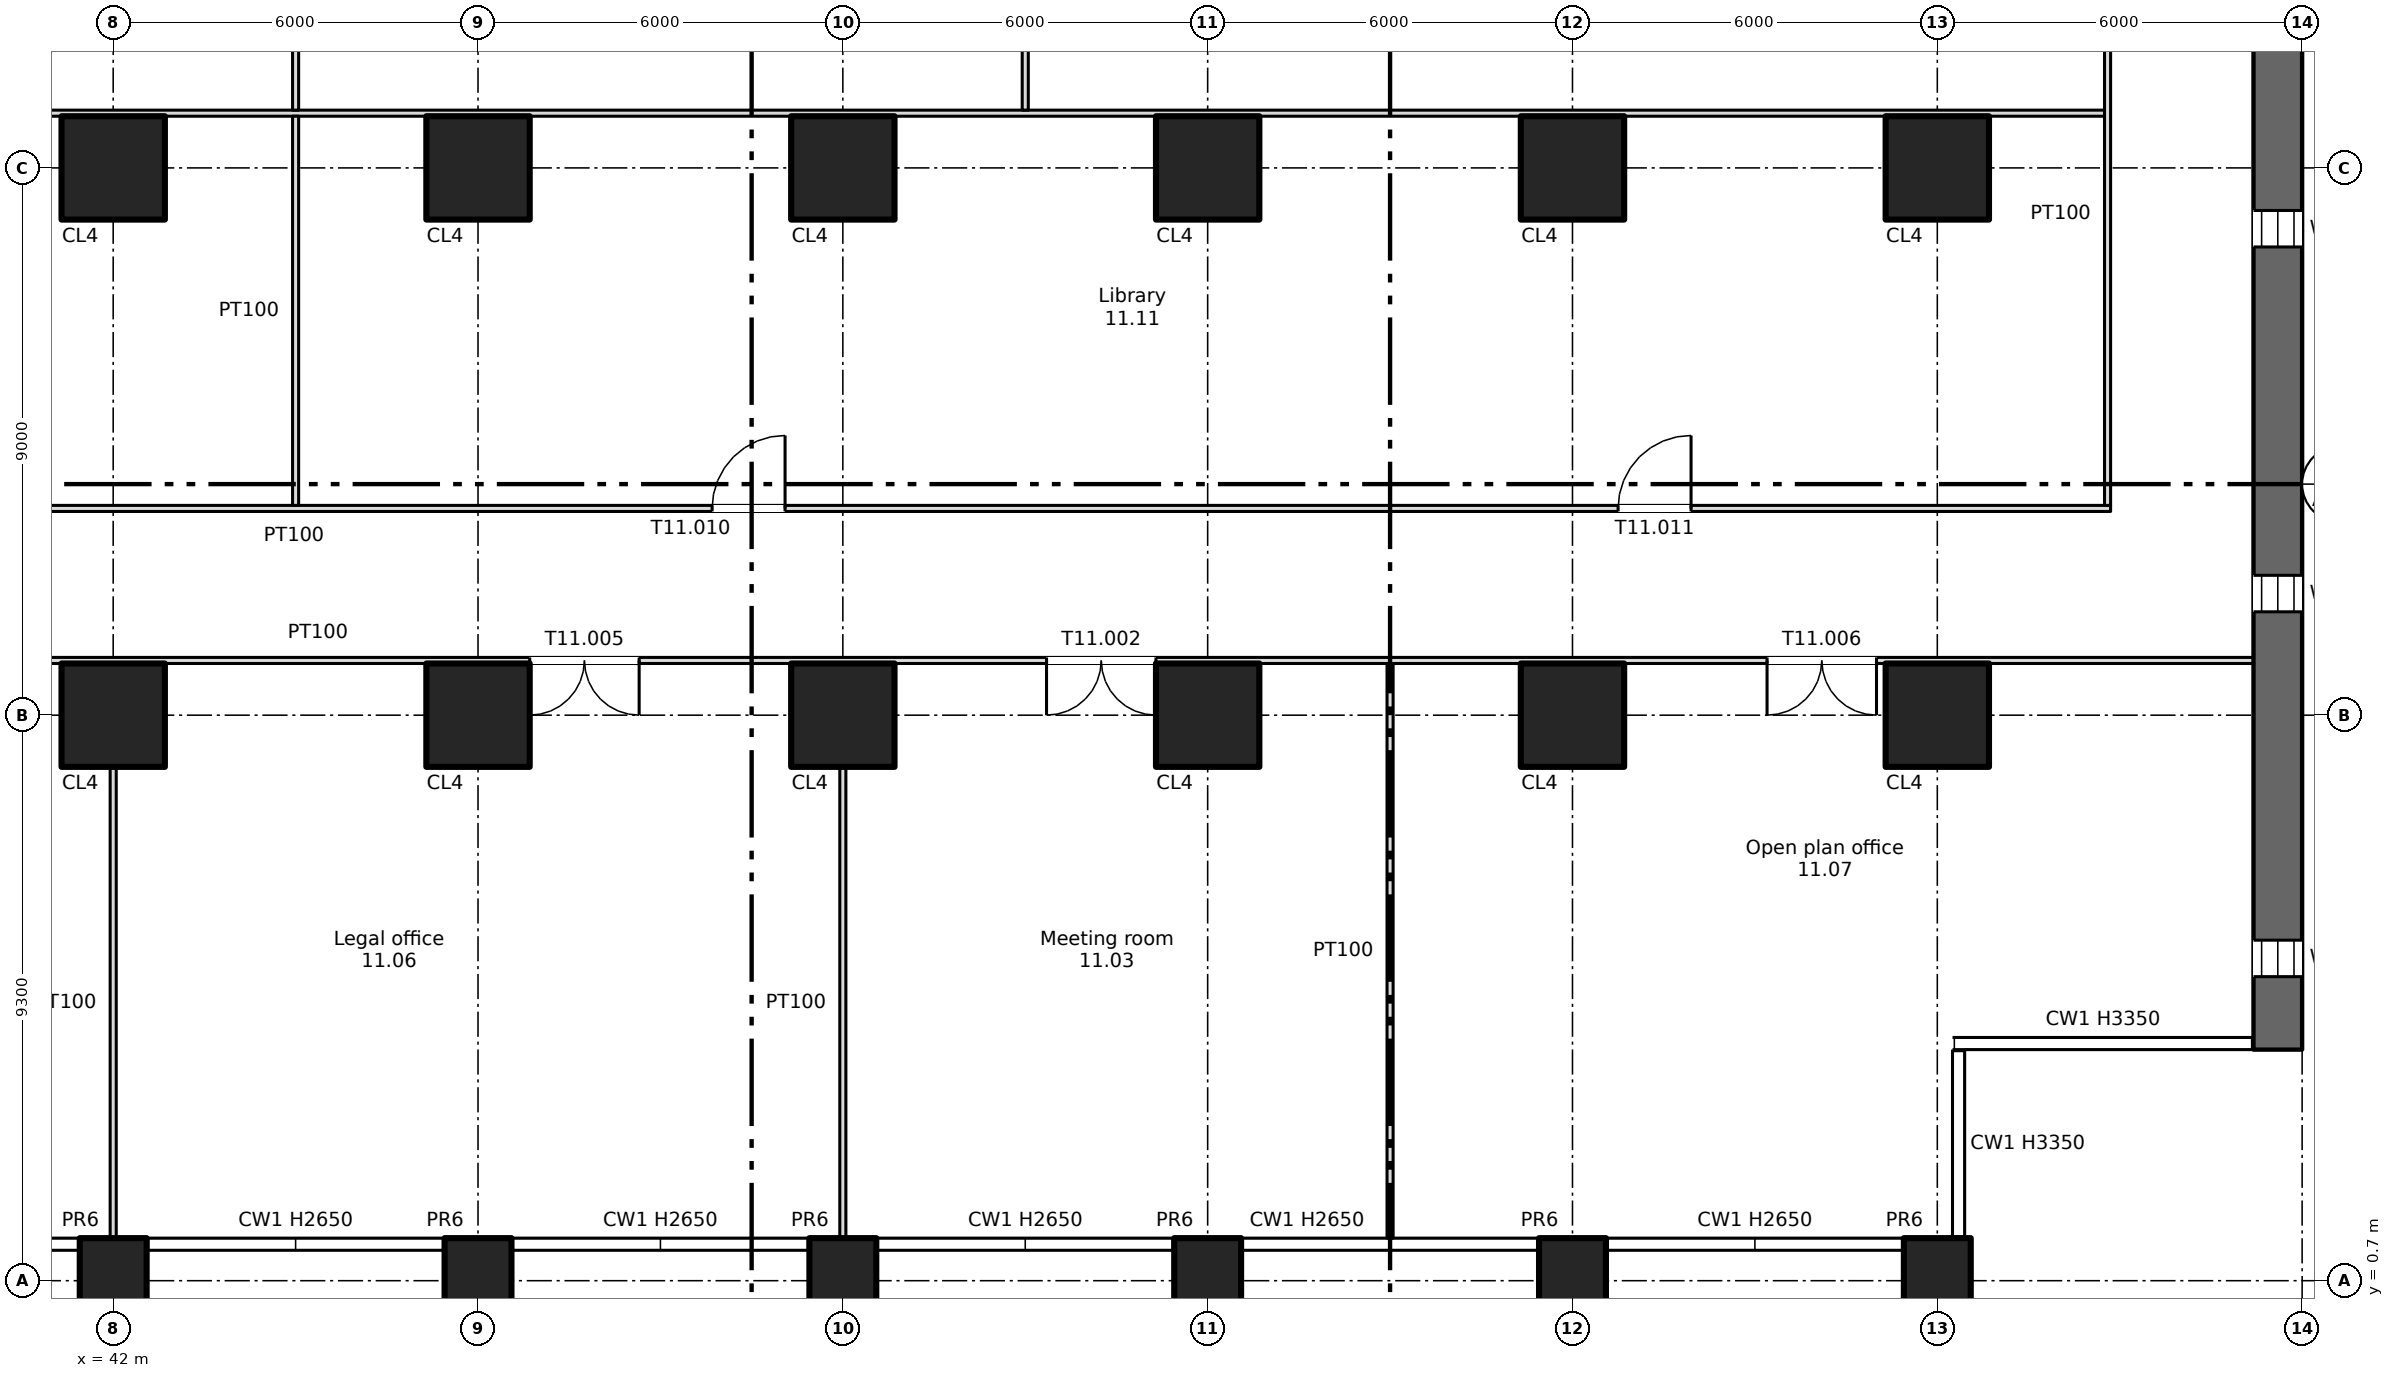
"""IFC4 building model, lengths in metres.
Left out: names, types, materials, properties, quantities, classifications, styles, units other than length and angle.
Written with IfcOpenShell. Run it as: python <this file> out.ifc"""

import sys

from ifc_helpers import new_model, si_unit, direction, frame, frame_2d, origin, origin_2d, place, context, subcontext, project, spatial, rectangle, extrude, element, fill, save


model = new_model("IFC4")
c1 = context("Model", 3, precision=1e-05, world=origin(), true_north=direction((0.0, 1.0)))
c2 = subcontext(c1, "Body", "Model", "MODEL_VIEW")
j1 = project(units=[si_unit("LENGTHUNIT", "METRE"), si_unit("PLANEANGLEUNIT", "RADIAN")], contexts=[c1])
p1 = place(None, origin())
s1 = spatial("IfcSite", under=j1, at=p1, CompositionType="ELEMENT")
p2 = place(p1, origin())
s2 = spatial("IfcBuilding", under=s1, at=p2, CompositionType="ELEMENT")
p3 = place(p2, frame((0.0, 0.0, 52.5)))
s3 = spatial("IfcBuildingStorey", under=s2, at=p3, CompositionType="ELEMENT", Elevation=52.5)
for number, where, z_axis, x_axis in (
    (1, (42.0, 0.7, -0.4), (0.0, 0.0, 1.0), (1.0, 0.0, 0.0)),
    (2, (48.0, 0.7, -0.4), (0.0, 0.0, 1.0), (1.0, 0.0, 0.0)),
    (3, (54.0, 0.7, -0.4), (0.0, 0.0, 1.0), (1.0, 0.0, 0.0)),
    (4, (60.0, 0.7, -0.4), (0.0, 0.0, 1.0), (1.0, 0.0, 0.0)),
    (5, (66.0, 0.7, -0.4), (0.0, 0.0, 1.0), (1.0, 0.0, 0.0)),
    (6, (72.0, 0.7, -0.4), (0.0, 0.0, 1.0), (1.0, 0.0, 0.0)),
):
    element("IfcColumn", number, at=place(p3, frame(where, z_axis=z_axis, x_axis=x_axis)), inside=s3, PredefinedType="COLUMN", context=c2, shape_type="SweptSolid", body=[
        extrude(rectangle(XDim=1.1, YDim=1.4, at=origin_2d()), origin(), (0.0, 0.0, 1.0), 3.75),
    ])
for number, where, z_axis, x_axis in (
    (7, (42.0, 10.0, 0.0), (0.0, 0.0, 1.0), (1.0, 0.0, 0.0)),
    (8, (42.0, 19.0, 0.0), (0.0, 0.0, 1.0), (1.0, 0.0, 0.0)),
    (9, (48.0, 10.0, 0.0), (0.0, 0.0, 1.0), (1.0, 0.0, 0.0)),
    (10, (48.0, 19.0, 0.0), (0.0, 0.0, 1.0), (1.0, 0.0, 0.0)),
    (11, (54.0, 10.0, 0.0), (0.0, 0.0, 1.0), (1.0, 0.0, 0.0)),
    (12, (54.0, 19.0, 0.0), (0.0, 0.0, 1.0), (1.0, 0.0, 0.0)),
    (13, (60.0, 10.0, 0.0), (0.0, 0.0, 1.0), (1.0, 0.0, 0.0)),
    (14, (60.0, 19.0, 0.0), (0.0, 0.0, 1.0), (1.0, 0.0, 0.0)),
    (15, (66.0, 10.0, 0.0), (0.0, 0.0, 1.0), (1.0, 0.0, 0.0)),
    (16, (66.0, 19.0, 0.0), (0.0, 0.0, 1.0), (1.0, 0.0, 0.0)),
    (17, (72.0, 10.0, 0.0), (0.0, 0.0, 1.0), (1.0, 0.0, 0.0)),
    (18, (72.0, 19.0, 0.0), (0.0, 0.0, 1.0), (1.0, 0.0, 0.0)),
):
    element("IfcColumn", number, at=place(p3, frame(where, z_axis=z_axis, x_axis=x_axis)), inside=s3, PredefinedType="COLUMN", context=c2, shape_type="SweptSolid", body=[
        extrude(rectangle(XDim=1.7, YDim=1.7, at=origin_2d()), origin(), (0.0, 0.0, 1.0), 3.35),
    ])
p4 = place(p3, frame((77.6, 4.5, 0.0), z_axis=(0.0, 0.0, 1.0), x_axis=(0.0, 1.0, 0.0)))
e19 = element("IfcWall", 19, at=p4, inside=s3, PredefinedType="SHEAR", context=c2, shape_type="SweptSolid", body=[
    extrude(rectangle(XDim=37.0, YDim=0.8, at=frame_2d((18.5, 0.0))), origin(), (0.0, 0.0, 1.0), 3.35),
])
p5 = place(p4, frame((1.2, 0.0, 0.6)))
e20 = element("IfcOpeningElement", 20, at=p5, cuts=e19, PredefinedType="OPENING", context=c2, shape_type="SweptSolid", body=[
    extrude(rectangle(XDim=0.6, YDim=2.4, at=frame_2d((0.3, 1.2))), frame((0.0, 0.41, 0.0), z_axis=(0.0, -1.0, 0.0), x_axis=(1.0, 0.0, 0.0)), (0.0, 0.0, 1.0), 0.82),
])
p6 = place(p4, frame((7.2, 0.0, 0.6)))
e21 = element("IfcOpeningElement", 21, at=p6, cuts=e19, PredefinedType="OPENING", context=c2, shape_type="SweptSolid", body=[
    extrude(rectangle(XDim=0.6, YDim=2.4, at=frame_2d((0.3, 1.2))), frame((0.0, 0.41, 0.0), z_axis=(0.0, -1.0, 0.0), x_axis=(1.0, 0.0, 0.0)), (0.0, 0.0, 1.0), 0.82),
])
p7 = place(p4, frame((13.2, 0.0, 0.6)))
e22 = element("IfcOpeningElement", 22, at=p7, cuts=e19, PredefinedType="OPENING", context=c2, shape_type="SweptSolid", body=[
    extrude(rectangle(XDim=0.6, YDim=2.4, at=frame_2d((0.3, 1.2))), frame((0.0, 0.41, 0.0), z_axis=(0.0, -1.0, 0.0), x_axis=(1.0, 0.0, 0.0)), (0.0, 0.0, 1.0), 0.82),
])
p8 = place(p4, frame((19.2, 0.0, 0.6)))
e23 = element("IfcOpeningElement", 23, at=p8, cuts=e19, PredefinedType="OPENING", context=c2, shape_type="SweptSolid", body=[
    extrude(rectangle(XDim=0.6, YDim=2.4, at=frame_2d((0.3, 1.2))), frame((0.0, 0.41, 0.0), z_axis=(0.0, -1.0, 0.0), x_axis=(1.0, 0.0, 0.0)), (0.0, 0.0, 1.0), 0.82),
])
p9 = place(p4, frame((25.2, 0.0, 0.6)))
e24 = element("IfcOpeningElement", 24, at=p9, cuts=e19, PredefinedType="OPENING", context=c2, shape_type="SweptSolid", body=[
    extrude(rectangle(XDim=0.6, YDim=2.4, at=frame_2d((0.3, 1.2))), frame((0.0, 0.41, 0.0), z_axis=(0.0, -1.0, 0.0), x_axis=(1.0, 0.0, 0.0)), (0.0, 0.0, 1.0), 0.82),
])
p10 = place(p4, frame((31.2, 0.0, 0.6)))
e25 = element("IfcOpeningElement", 25, at=p10, cuts=e19, PredefinedType="OPENING", context=c2, shape_type="SweptSolid", body=[
    extrude(rectangle(XDim=0.6, YDim=2.4, at=frame_2d((0.3, 1.2))), frame((0.0, 0.41, 0.0), z_axis=(0.0, -1.0, 0.0), x_axis=(1.0, 0.0, 0.0)), (0.0, 0.0, 1.0), 0.82),
])
p11 = place(p3, frame((0.8, 10.9, 0.0), z_axis=(0.0, 0.0, 1.0), x_axis=(1.0, 0.0, 0.0)))
e26 = element("IfcWall", 26, at=p11, inside=s3, PredefinedType="PARTITIONING", context=c2, shape_type="SweptSolid", body=[
    extrude(rectangle(XDim=76.4, YDim=0.1, at=frame_2d((38.2, 0.0))), origin(), (0.0, 0.0, 1.0), 3.35),
])
p12 = place(p11, frame((12.05, 0.0, 0.0)))
e27 = element("IfcOpeningElement", 27, at=p12, cuts=e26, PredefinedType="OPENING", context=c2, shape_type="SweptSolid", body=[
    extrude(rectangle(XDim=1.8, YDim=2.1, at=frame_2d((0.9, 1.05))), frame((0.0, 0.06, 0.0), z_axis=(0.0, -1.0, 0.0), x_axis=(1.0, 0.0, 0.0)), (0.0, 0.0, 1.0), 0.12),
])
p13 = place(p11, frame((56.55, 0.0, 0.0)))
e28 = element("IfcOpeningElement", 28, at=p13, cuts=e26, PredefinedType="OPENING", context=c2, shape_type="SweptSolid", body=[
    extrude(rectangle(XDim=1.8, YDim=2.1, at=frame_2d((0.9, 1.05))), frame((0.0, 0.06, 0.0), z_axis=(0.0, -1.0, 0.0), x_axis=(1.0, 0.0, 0.0)), (0.0, 0.0, 1.0), 0.12),
])
p14 = place(p11, frame((24.05, 0.0, 0.0)))
e29 = element("IfcOpeningElement", 29, at=p14, cuts=e26, PredefinedType="OPENING", context=c2, shape_type="SweptSolid", body=[
    extrude(rectangle(XDim=1.8, YDim=2.1, at=frame_2d((0.9, 1.05))), frame((0.0, 0.06, 0.0), z_axis=(0.0, -1.0, 0.0), x_axis=(1.0, 0.0, 0.0)), (0.0, 0.0, 1.0), 0.12),
])
p15 = place(p11, frame((36.05, 0.0, 0.0)))
e30 = element("IfcOpeningElement", 30, at=p15, cuts=e26, PredefinedType="OPENING", context=c2, shape_type="SweptSolid", body=[
    extrude(rectangle(XDim=1.8, YDim=2.1, at=frame_2d((0.9, 1.05))), frame((0.0, 0.06, 0.0), z_axis=(0.0, -1.0, 0.0), x_axis=(1.0, 0.0, 0.0)), (0.0, 0.0, 1.0), 0.12),
])
p16 = place(p11, frame((48.05, 0.0, 0.0)))
e31 = element("IfcOpeningElement", 31, at=p16, cuts=e26, PredefinedType="OPENING", context=c2, shape_type="SweptSolid", body=[
    extrude(rectangle(XDim=1.8, YDim=2.1, at=frame_2d((0.9, 1.05))), frame((0.0, 0.06, 0.0), z_axis=(0.0, -1.0, 0.0), x_axis=(1.0, 0.0, 0.0)), (0.0, 0.0, 1.0), 0.12),
])
p17 = place(p11, frame((68.4, 0.0, 0.0)))
e32 = element("IfcOpeningElement", 32, at=p17, cuts=e26, PredefinedType="OPENING", context=c2, shape_type="SweptSolid", body=[
    extrude(rectangle(XDim=1.8, YDim=2.1, at=frame_2d((0.9, 1.05))), frame((0.0, 0.06, 0.0), z_axis=(0.0, -1.0, 0.0), x_axis=(1.0, 0.0, 0.0)), (0.0, 0.0, 1.0), 0.12),
])
p18 = place(p11, frame((2.45, 0.0, 0.0)))
e33 = element("IfcOpeningElement", 33, at=p18, cuts=e26, PredefinedType="OPENING", context=c2, shape_type="SweptSolid", body=[
    extrude(rectangle(XDim=1.8, YDim=2.1, at=frame_2d((0.9, 1.05))), frame((0.0, 0.06, 0.0), z_axis=(0.0, -1.0, 0.0), x_axis=(1.0, 0.0, 0.0)), (0.0, 0.0, 1.0), 0.12),
])
p19 = place(p3, frame((3.15, 13.4, 0.0), z_axis=(0.0, 0.0, 1.0), x_axis=(1.0, 0.0, 0.0)))
e34 = element("IfcWall", 34, at=p19, inside=s3, PredefinedType="PARTITIONING", context=c2, shape_type="SweptSolid", body=[
    extrude(rectangle(XDim=71.7, YDim=0.1, at=frame_2d((35.85, 0.0))), origin(), (0.0, 0.0, 1.0), 3.35),
])
p20 = place(p19, frame((6.55, 0.0, 0.0)))
e35 = element("IfcOpeningElement", 35, at=p20, cuts=e34, PredefinedType="OPENING", context=c2, shape_type="SweptSolid", body=[
    extrude(rectangle(XDim=1.8, YDim=2.1, at=frame_2d((0.9, 1.05))), frame((0.0, 0.06, 0.0), z_axis=(0.0, -1.0, 0.0), x_axis=(1.0, 0.0, 0.0)), (0.0, 0.0, 1.0), 0.12),
])
p21 = place(p19, frame((33.45, 0.0, 0.0)))
e36 = element("IfcOpeningElement", 36, at=p21, cuts=e34, PredefinedType="OPENING", context=c2, shape_type="SweptSolid", body=[
    extrude(rectangle(XDim=1.8, YDim=2.1, at=frame_2d((0.9, 1.05))), frame((0.0, 0.06, 0.0), z_axis=(0.0, -1.0, 0.0), x_axis=(1.0, 0.0, 0.0)), (0.0, 0.0, 1.0), 0.12),
])
p22 = place(p19, frame((48.7, 0.0, 0.0)))
e37 = element("IfcOpeningElement", 37, at=p22, cuts=e34, PredefinedType="OPENING", context=c2, shape_type="SweptSolid", body=[
    extrude(rectangle(XDim=1.2, YDim=2.1, at=frame_2d((0.6, 1.05))), frame((0.0, 0.06, 0.0), z_axis=(0.0, -1.0, 0.0), x_axis=(1.0, 0.0, 0.0)), (0.0, 0.0, 1.0), 0.12),
])
p23 = place(p19, frame((63.6, 0.0, 0.0)))
e38 = element("IfcOpeningElement", 38, at=p23, cuts=e34, PredefinedType="OPENING", context=c2, shape_type="SweptSolid", body=[
    extrude(rectangle(XDim=1.2, YDim=2.1, at=frame_2d((0.6, 1.05))), frame((0.0, 0.06, 0.0), z_axis=(0.0, -1.0, 0.0), x_axis=(1.0, 0.0, 0.0)), (0.0, 0.0, 1.0), 0.12),
])
p24 = place(p19, frame((19.95, 0.0, 0.0)))
e39 = element("IfcOpeningElement", 39, at=p24, cuts=e34, PredefinedType="OPENING", context=c2, shape_type="SweptSolid", body=[
    extrude(rectangle(XDim=1.8, YDim=2.1, at=frame_2d((0.9, 1.05))), frame((0.0, 0.06, 0.0), z_axis=(0.0, -1.0, 0.0), x_axis=(1.0, 0.0, 0.0)), (0.0, 0.0, 1.0), 0.12),
])
p25 = place(p3, frame((3.25, 19.9, 0.0), z_axis=(0.0, 0.0, 1.0), x_axis=(1.0, 0.0, 0.0)))
e40 = element("IfcWall", 40, at=p25, inside=s3, PredefinedType="PARTITIONING", context=c2, shape_type="SweptSolid", body=[
    extrude(rectangle(XDim=71.5, YDim=0.1, at=frame_2d((35.75, 0.0))), origin(), (0.0, 0.0, 1.0), 3.35),
])
p26 = place(p3, frame((42.0, 1.4, 0.0), z_axis=(0.0, 0.0, 1.0), x_axis=(0.0, 1.0, 0.0)))
e41 = element("IfcWall", 41, at=p26, inside=s3, PredefinedType="PARTITIONING", context=c2, shape_type="SweptSolid", body=[
    extrude(rectangle(XDim=7.75, YDim=0.1, at=frame_2d((3.875, 0.0))), origin(), (0.0, 0.0, 1.0), 3.35),
])
p27 = place(p3, frame((45.0, 13.45, 0.0), z_axis=(0.0, 0.0, 1.0), x_axis=(0.0, 1.0, 0.0)))
e42 = element("IfcWall", 42, at=p27, inside=s3, PredefinedType="PARTITIONING", context=c2, shape_type="SweptSolid", body=[
    extrude(rectangle(XDim=6.4, YDim=0.1, at=frame_2d((3.2, 0.0))), origin(), (0.0, 0.0, 1.0), 3.35),
])
p28 = place(p3, frame((45.0, 19.95, 0.0), z_axis=(0.0, 0.0, 1.0), x_axis=(0.0, 1.0, 0.0)))
e43 = element("IfcWall", 43, at=p28, inside=s3, PredefinedType="PARTITIONING", context=c2, shape_type="SweptSolid", body=[
    extrude(rectangle(XDim=5.0, YDim=0.1, at=frame_2d((2.5, 0.0))), origin(), (0.0, 0.0, 1.0), 3.35),
])
p29 = place(p3, frame((54.0, 1.4, 0.0), z_axis=(0.0, 0.0, 1.0), x_axis=(0.0, 1.0, 0.0)))
e44 = element("IfcWall", 44, at=p29, inside=s3, PredefinedType="PARTITIONING", context=c2, shape_type="SweptSolid", body=[
    extrude(rectangle(XDim=7.75, YDim=0.1, at=frame_2d((3.875, 0.0))), origin(), (0.0, 0.0, 1.0), 3.35),
])
p30 = place(p3, frame((57.0, 19.95, 0.0), z_axis=(0.0, 0.0, 1.0), x_axis=(0.0, 1.0, 0.0)))
e45 = element("IfcWall", 45, at=p30, inside=s3, PredefinedType="PARTITIONING", context=c2, shape_type="SweptSolid", body=[
    extrude(rectangle(XDim=5.0, YDim=0.1, at=frame_2d((2.5, 0.0))), origin(), (0.0, 0.0, 1.0), 3.35),
])
p31 = place(p3, frame((63.0, 1.4, 0.0), z_axis=(0.0, 0.0, 1.0), x_axis=(0.0, 1.0, 0.0)))
e46 = element("IfcWall", 46, at=p31, inside=s3, PredefinedType="PARTITIONING", context=c2, shape_type="SweptSolid", body=[
    extrude(rectangle(XDim=9.45, YDim=0.1, at=frame_2d((4.725, 0.0))), origin(), (0.0, 0.0, 1.0), 3.35),
])
p32 = place(p3, frame((74.8, 13.45, 0.0), z_axis=(0.0, 0.0, 1.0), x_axis=(0.0, 1.0, 0.0)))
e47 = element("IfcWall", 47, at=p32, inside=s3, PredefinedType="PARTITIONING", context=c2, shape_type="SweptSolid", body=[
    extrude(rectangle(XDim=11.5, YDim=0.1, at=frame_2d((5.75, 0.0))), origin(), (0.0, 0.0, 1.0), 3.35),
])
p33 = place(p5, origin())
e48 = element("IfcWindow", 48, at=p33, inside=s3, PartitioningType="SINGLE_PANEL", PredefinedType="WINDOW", context=c2, shape_type="SweptSolid", body=[
    extrude(rectangle(XDim=0.6, YDim=2.4, at=frame_2d((0.3, 1.2))), frame((0.0, 0.03, 0.0), z_axis=(0.0, -1.0, 0.0), x_axis=(1.0, 0.0, 0.0)), (0.0, 0.0, 1.0), 0.06),
])
fill(e20, e48)
p34 = place(p6, origin())
e49 = element("IfcWindow", 49, at=p34, inside=s3, PartitioningType="SINGLE_PANEL", PredefinedType="WINDOW", context=c2, shape_type="SweptSolid", body=[
    extrude(rectangle(XDim=0.6, YDim=2.4, at=frame_2d((0.3, 1.2))), frame((0.0, 0.03, 0.0), z_axis=(0.0, -1.0, 0.0), x_axis=(1.0, 0.0, 0.0)), (0.0, 0.0, 1.0), 0.06),
])
fill(e21, e49)
p35 = place(p7, origin())
e50 = element("IfcWindow", 50, at=p35, inside=s3, PartitioningType="SINGLE_PANEL", PredefinedType="WINDOW", context=c2, shape_type="SweptSolid", body=[
    extrude(rectangle(XDim=0.6, YDim=2.4, at=frame_2d((0.3, 1.2))), frame((0.0, 0.03, 0.0), z_axis=(0.0, -1.0, 0.0), x_axis=(1.0, 0.0, 0.0)), (0.0, 0.0, 1.0), 0.06),
])
fill(e22, e50)
p36 = place(p13, origin())
e51 = element("IfcDoor", 51, at=p36, inside=s3, OperationType="DOUBLE_DOOR_SINGLE_SWING", PredefinedType="DOOR", context=c2, shape_type="SweptSolid", body=[
    extrude(rectangle(XDim=1.8, YDim=2.1, at=frame_2d((0.9, 1.05))), frame((0.0, 0.025, 0.0), z_axis=(0.0, -1.0, 0.0), x_axis=(1.0, 0.0, 0.0)), (0.0, 0.0, 1.0), 0.05),
])
fill(e28, e51)
p37 = place(p16, origin())
e52 = element("IfcDoor", 52, at=p37, inside=s3, OperationType="DOUBLE_DOOR_SINGLE_SWING", PredefinedType="DOOR", context=c2, shape_type="SweptSolid", body=[
    extrude(rectangle(XDim=1.8, YDim=2.1, at=frame_2d((0.9, 1.05))), frame((0.0, 0.025, 0.0), z_axis=(0.0, -1.0, 0.0), x_axis=(1.0, 0.0, 0.0)), (0.0, 0.0, 1.0), 0.05),
])
fill(e31, e52)
p38 = place(p17, origin())
e53 = element("IfcDoor", 53, at=p38, inside=s3, OperationType="DOUBLE_DOOR_SINGLE_SWING", PredefinedType="DOOR", context=c2, shape_type="SweptSolid", body=[
    extrude(rectangle(XDim=1.8, YDim=2.1, at=frame_2d((0.9, 1.05))), frame((0.0, 0.025, 0.0), z_axis=(0.0, -1.0, 0.0), x_axis=(1.0, 0.0, 0.0)), (0.0, 0.0, 1.0), 0.05),
])
fill(e32, e53)
p39 = place(p22, origin())
e54 = element("IfcDoor", 54, at=p39, inside=s3, OperationType="SINGLE_SWING_RIGHT", PredefinedType="DOOR", context=c2, shape_type="SweptSolid", body=[
    extrude(rectangle(XDim=1.2, YDim=2.1, at=frame_2d((0.6, 1.05))), frame((0.0, 0.025, 0.0), z_axis=(0.0, -1.0, 0.0), x_axis=(1.0, 0.0, 0.0)), (0.0, 0.0, 1.0), 0.05),
])
fill(e37, e54)
p40 = place(p23, origin())
e55 = element("IfcDoor", 55, at=p40, inside=s3, OperationType="SINGLE_SWING_RIGHT", PredefinedType="DOOR", context=c2, shape_type="SweptSolid", body=[
    extrude(rectangle(XDim=1.2, YDim=2.1, at=frame_2d((0.6, 1.05))), frame((0.0, 0.025, 0.0), z_axis=(0.0, -1.0, 0.0), x_axis=(1.0, 0.0, 0.0)), (0.0, 0.0, 1.0), 0.05),
])
fill(e38, e55)
save(model, sys.argv[1])
